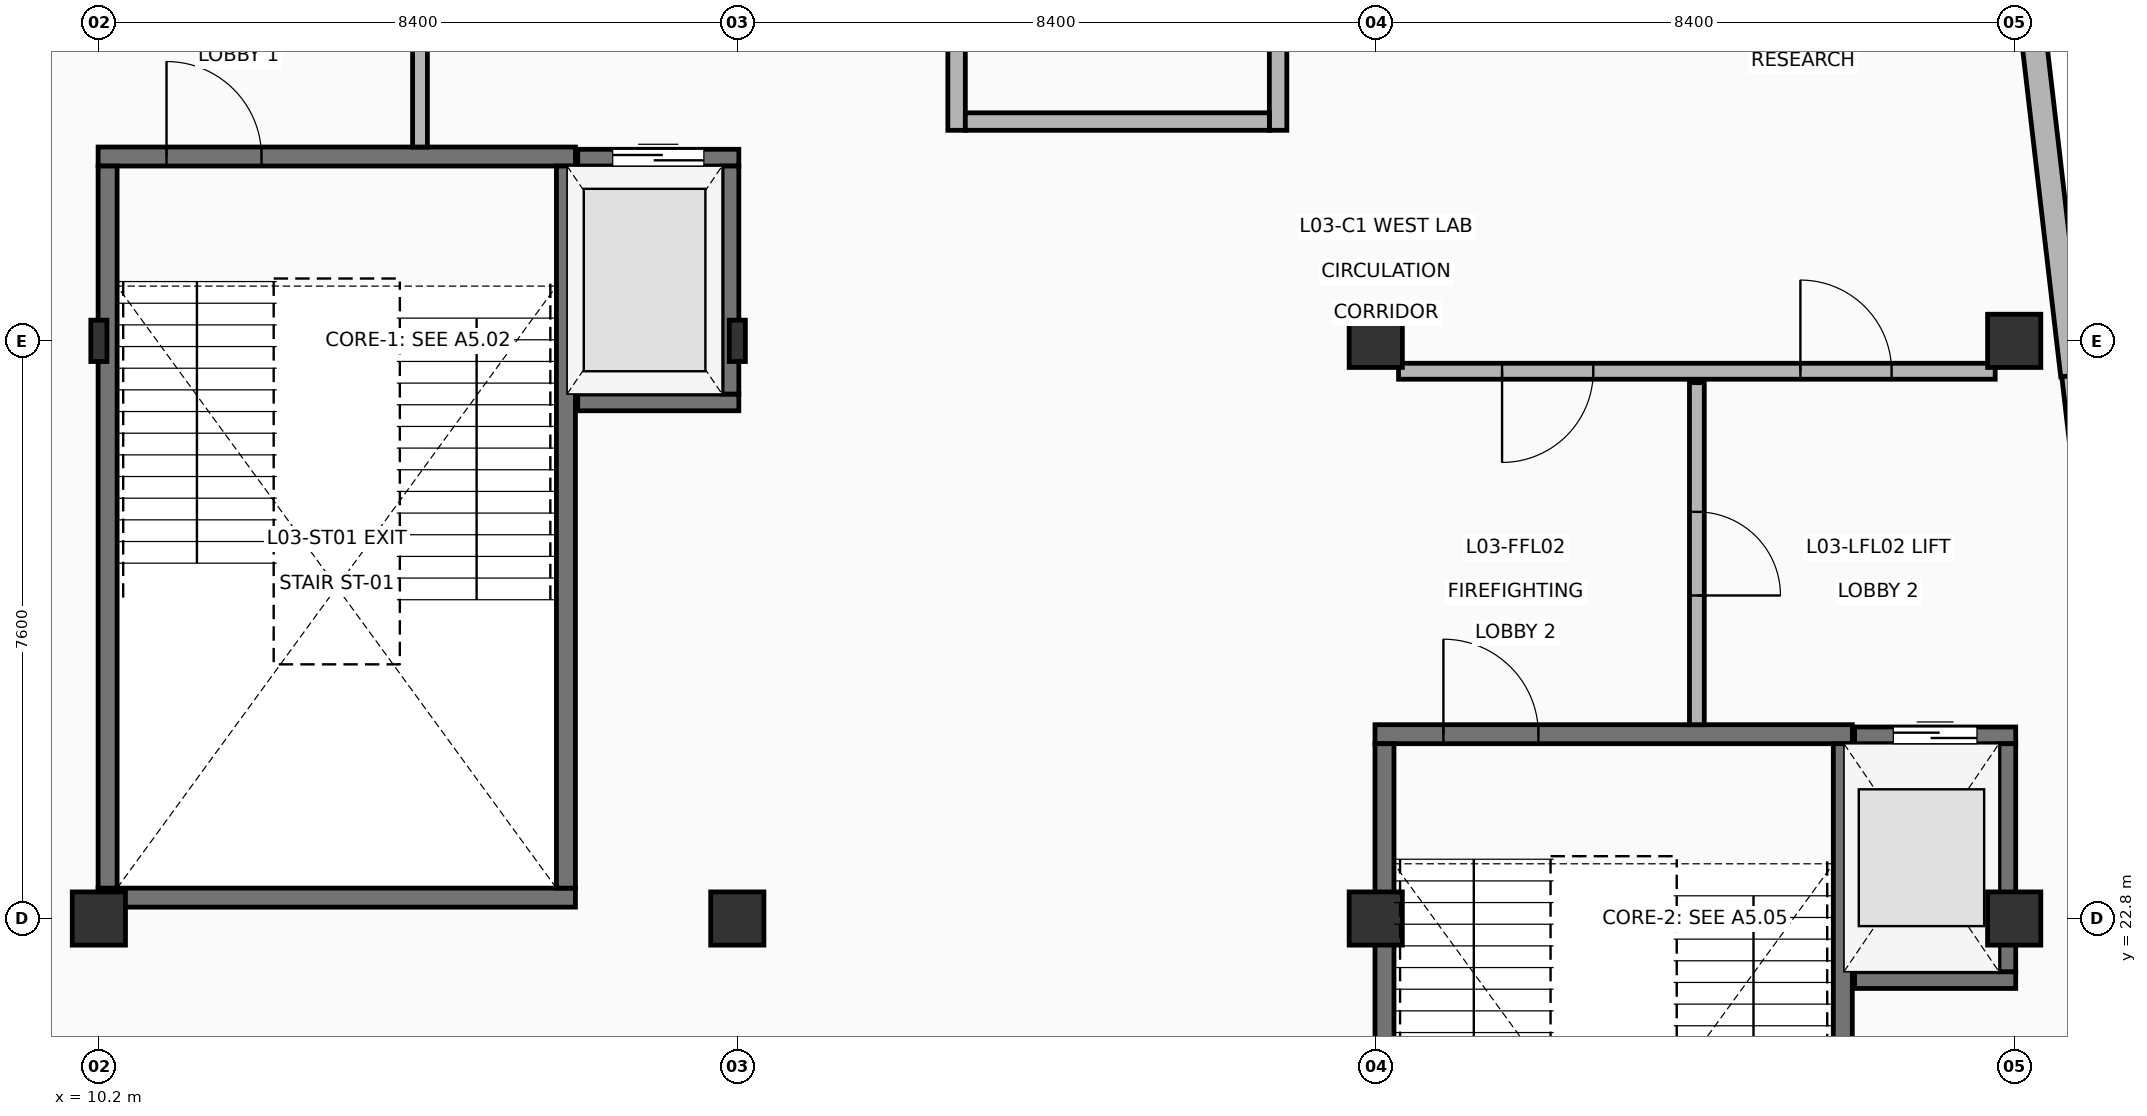
"""IFC4 building model, lengths in metres.
Left out: names, types, materials, properties, quantities, classifications, styles, units other than length and angle.
Written with IfcOpenShell. Run it as: python <this file> out.ifc"""

import sys

from ifc_helpers import new_model, si_unit, direction, frame, frame_2d, origin, origin_2d, place, context, subcontext, project, spatial, rectangle, i_section, extrude, element, fill, save


model = new_model("IFC4")
c1 = context("Model", 3, precision=1e-05, world=origin(), true_north=direction((0.0, 1.0)))
c2 = subcontext(c1, "Body", "Model", "MODEL_VIEW")
j1 = project(units=[si_unit("LENGTHUNIT", "METRE"), si_unit("PLANEANGLEUNIT", "RADIAN")], contexts=[c1])
p1 = place(None, origin())
s1 = spatial("IfcSite", under=j1, at=p1, CompositionType="ELEMENT")
p2 = place(p1, origin())
s2 = spatial("IfcBuilding", under=s1, at=p2, CompositionType="ELEMENT")
p3 = place(p2, frame((0.0, 0.0, 10.5)))
s3 = spatial("IfcBuildingStorey", under=s2, at=p3, CompositionType="ELEMENT", Elevation=10.5)
p4 = place(p3, frame((10.2, 22.8, 0.0), z_axis=(0.0, 0.0, 1.0), x_axis=(1.0, 0.0, 0.0)))
e1 = element("IfcColumn", 1, at=p4, inside=s3, PredefinedType="COLUMN", context=c2, shape_type="SweptSolid", body=[
    extrude(rectangle(XDim=0.7, YDim=0.7, at=origin_2d()), origin(), (0.0, 0.0, 1.0), 4.8),
])
p5 = place(p3, frame((10.2, 30.4, 0.0), z_axis=(0.0, 0.0, 1.0), x_axis=(1.0, 0.0, 0.0)))
e2 = element("IfcColumn", 2, at=p5, inside=s3, PredefinedType="COLUMN", context=c2, shape_type="SweptSolid", body=[
    extrude(i_section(OverallWidth=0.212, OverallDepth=0.544, WebThickness=0.013, FlangeThickness=0.021, at=origin_2d()), origin(), (0.0, 0.0, 1.0), 4.8),
])
p6 = place(p3, frame((18.6, 22.8, 0.0), z_axis=(0.0, 0.0, 1.0), x_axis=(1.0, 0.0, 0.0)))
e3 = element("IfcColumn", 3, at=p6, inside=s3, PredefinedType="COLUMN", context=c2, shape_type="SweptSolid", body=[
    extrude(rectangle(XDim=0.7, YDim=0.7, at=origin_2d()), origin(), (0.0, 0.0, 1.0), 4.8),
])
p7 = place(p3, frame((18.6, 30.4, 0.0), z_axis=(0.0, 0.0, 1.0), x_axis=(1.0, 0.0, 0.0)))
e4 = element("IfcColumn", 4, at=p7, inside=s3, PredefinedType="COLUMN", context=c2, shape_type="SweptSolid", body=[
    extrude(i_section(OverallWidth=0.212, OverallDepth=0.544, WebThickness=0.013, FlangeThickness=0.021, at=origin_2d()), origin(), (0.0, 0.0, 1.0), 4.8),
])
for number, where, z_axis, x_axis in (
    (5, (27.0, 22.8, 0.0), (0.0, 0.0, 1.0), (1.0, 0.0, 0.0)),
    (6, (27.0, 30.4, 0.0), (0.0, 0.0, 1.0), (1.0, 0.0, 0.0)),
    (7, (35.4, 22.8, 0.0), (0.0, 0.0, 1.0), (1.0, 0.0, 0.0)),
    (8, (35.4, 30.4, 0.0), (0.0, 0.0, 1.0), (1.0, 0.0, 0.0)),
):
    element("IfcColumn", number, at=place(p3, frame(where, z_axis=z_axis, x_axis=x_axis)), inside=s3, PredefinedType="COLUMN", context=c2, shape_type="SweptSolid", body=[
        extrude(rectangle(XDim=0.7, YDim=0.7, at=origin_2d()), origin(), (0.0, 0.0, 1.0), 4.8),
    ])
p8 = place(p3, frame((35.282, 37.611, 0.0), z_axis=(0.0, 0.0, 1.0), x_axis=(0.115574885505, -0.993298769676, 0.0)))
e9 = element("IfcWall", 9, at=p8, inside=s3, PredefinedType="SOLIDWALL", context=c2, shape_type="SweptSolid", body=[
    extrude(rectangle(XDim=7.719, YDim=0.325, at=frame_2d((3.859, 0.0))), origin(), (0.0, 0.0, 1.0), 4.026),
])
p9 = place(p3, frame((36.181, 29.945, 0.0), z_axis=(0.0, 0.0, 1.0), x_axis=(0.115623027475, -0.993293166954, 0.0)))
e10 = element("IfcWall", 10, at=p9, inside=s3, PredefinedType="SOLIDWALL", context=c2, shape_type="SweptSolid", body=[
    extrude(rectangle(XDim=8.07, YDim=0.312, at=frame_2d((4.035, 0.0))), origin(), (0.0, 0.0, 1.0), 4.575),
])
p10 = place(p3, frame((10.19, 23.075, 0.0), z_axis=(0.0, 0.0, 1.0), x_axis=(1.0, 0.0, 0.0)))
e11 = element("IfcWall", 11, at=p10, inside=s3, PredefinedType="SHEAR", context=c2, shape_type="SweptSolid", body=[
    extrude(rectangle(XDim=6.28, YDim=0.25, at=frame_2d((3.14, 0.0))), origin(), (0.0, 0.0, 1.0), 4.575),
])
p11 = place(p3, frame((10.19, 32.825, 0.0), z_axis=(0.0, 0.0, 1.0), x_axis=(1.0, 0.0, 0.0)))
e12 = element("IfcWall", 12, at=p11, inside=s3, PredefinedType="SHEAR", context=c2, shape_type="SweptSolid", body=[
    extrude(rectangle(XDim=6.28, YDim=0.25, at=frame_2d((3.14, 0.0))), origin(), (0.0, 0.0, 1.0), 4.575),
])
p12 = place(p11, frame((0.9, 0.0, 0.0)))
e13 = element("IfcOpeningElement", 13, at=p12, cuts=e12, PredefinedType="OPENING", context=c2, shape_type="SweptSolid", body=[
    extrude(rectangle(XDim=1.25, YDim=2.2, at=frame_2d((0.625, 1.1))), frame((0.0, 0.135, 0.0), z_axis=(0.0, -1.0, 0.0), x_axis=(1.0, 0.0, 0.0)), (0.0, 0.0, 1.0), 0.27),
])
for number, where, z_axis, x_axis in (
    (14, (10.315, 23.2, 0.0), (0.0, 0.0, 1.0), (0.0, 1.0, 0.0)),
    (15, (16.345, 23.2, 0.0), (0.0, 0.0, 1.0), (0.0, 1.0, 0.0)),
):
    element("IfcWall", number, at=place(p3, frame(where, z_axis=z_axis, x_axis=x_axis)), inside=s3, PredefinedType="SHEAR", context=c2, shape_type="SweptSolid", body=[
        extrude(rectangle(XDim=9.5, YDim=0.25, at=frame_2d((4.75, 0.0))), origin(), (0.0, 0.0, 1.0), 4.575),
    ])
p13 = place(p3, frame((16.5, 29.59, 0.0), z_axis=(0.0, 0.0, 1.0), x_axis=(1.0, 0.0, 0.0)))
e16 = element("IfcWall", 16, at=p13, inside=s3, PredefinedType="SHEAR", context=c2, shape_type="SweptSolid", body=[
    extrude(rectangle(XDim=2.12, YDim=0.22, at=frame_2d((1.06, 0.0))), origin(), (0.0, 0.0, 1.0), 4.575),
])
p14 = place(p3, frame((16.5, 32.81, 0.0), z_axis=(0.0, 0.0, 1.0), x_axis=(1.0, 0.0, 0.0)))
e17 = element("IfcWall", 17, at=p14, inside=s3, PredefinedType="SHEAR", context=c2, shape_type="SweptSolid", body=[
    extrude(rectangle(XDim=2.12, YDim=0.22, at=frame_2d((1.06, 0.0))), origin(), (0.0, 0.0, 1.0), 4.575),
])
p15 = place(p14, frame((0.46, 0.0, 0.0)))
e18 = element("IfcOpeningElement", 18, at=p15, cuts=e17, PredefinedType="OPENING", context=c2, shape_type="SweptSolid", body=[
    extrude(rectangle(XDim=1.2, YDim=2.2, at=frame_2d((0.6, 1.1))), frame((0.0, 0.12, 0.0), z_axis=(0.0, -1.0, 0.0), x_axis=(1.0, 0.0, 0.0)), (0.0, 0.0, 1.0), 0.24),
])
p16 = place(p3, frame((18.51, 29.7, 0.0), z_axis=(0.0, 0.0, 1.0), x_axis=(0.0, 1.0, 0.0)))
e19 = element("IfcWall", 19, at=p16, inside=s3, PredefinedType="SHEAR", context=c2, shape_type="SweptSolid", body=[
    extrude(rectangle(XDim=3.0, YDim=0.22, at=frame_2d((1.5, 0.0))), origin(), (0.0, 0.0, 1.0), 4.575),
])
p17 = place(p3, frame((14.425, 32.95, 0.0), z_axis=(0.0, 0.0, 1.0), x_axis=(0.0, 1.0, 0.0)))
e20 = element("IfcWall", 20, at=p17, inside=s3, PredefinedType="PARTITIONING", context=c2, shape_type="SweptSolid", body=[
    extrude(rectangle(XDim=4.5, YDim=0.195, at=frame_2d((2.25, 0.0))), origin(), (0.0, 0.0, 1.0), 4.575),
])
p18 = place(p17, frame((1.7, 0.0, 0.0)))
e21 = element("IfcOpeningElement", 21, at=p18, cuts=e20, PredefinedType="OPENING", context=c2, shape_type="SweptSolid", body=[
    extrude(rectangle(XDim=1.1, YDim=2.15, at=frame_2d((0.55, 1.075))), frame((0.0, 0.107, 0.0), z_axis=(0.0, -1.0, 0.0), x_axis=(1.0, 0.0, 0.0)), (0.0, 0.0, 1.0), 0.215),
])
p19 = place(p3, frame((26.99, 25.225, 0.0), z_axis=(0.0, 0.0, 1.0), x_axis=(1.0, 0.0, 0.0)))
e22 = element("IfcWall", 22, at=p19, inside=s3, PredefinedType="SHEAR", context=c2, shape_type="SweptSolid", body=[
    extrude(rectangle(XDim=6.28, YDim=0.25, at=frame_2d((3.14, 0.0))), origin(), (0.0, 0.0, 1.0), 4.575),
])
p20 = place(p19, frame((0.9, 0.0, 0.0)))
e23 = element("IfcOpeningElement", 23, at=p20, cuts=e22, PredefinedType="OPENING", context=c2, shape_type="SweptSolid", body=[
    extrude(rectangle(XDim=1.25, YDim=2.2, at=frame_2d((0.625, 1.1))), frame((0.0, 0.135, 0.0), z_axis=(0.0, -1.0, 0.0), x_axis=(1.0, 0.0, 0.0)), (0.0, 0.0, 1.0), 0.27),
])
for number, where, z_axis, x_axis in (
    (24, (27.115, 15.6, 0.0), (0.0, 0.0, 1.0), (0.0, 1.0, 0.0)),
    (25, (33.145, 15.6, 0.0), (0.0, 0.0, 1.0), (0.0, 1.0, 0.0)),
):
    element("IfcWall", number, at=place(p3, frame(where, z_axis=z_axis, x_axis=x_axis)), inside=s3, PredefinedType="SHEAR", context=c2, shape_type="SweptSolid", body=[
        extrude(rectangle(XDim=9.5, YDim=0.25, at=frame_2d((4.75, 0.0))), origin(), (0.0, 0.0, 1.0), 4.575),
    ])
p21 = place(p3, frame((33.3, 21.99, 0.0), z_axis=(0.0, 0.0, 1.0), x_axis=(1.0, 0.0, 0.0)))
e26 = element("IfcWall", 26, at=p21, inside=s3, PredefinedType="SHEAR", context=c2, shape_type="SweptSolid", body=[
    extrude(rectangle(XDim=2.12, YDim=0.22, at=frame_2d((1.06, 0.0))), origin(), (0.0, 0.0, 1.0), 4.575),
])
p22 = place(p3, frame((33.3, 25.21, 0.0), z_axis=(0.0, 0.0, 1.0), x_axis=(1.0, 0.0, 0.0)))
e27 = element("IfcWall", 27, at=p22, inside=s3, PredefinedType="SHEAR", context=c2, shape_type="SweptSolid", body=[
    extrude(rectangle(XDim=2.12, YDim=0.22, at=frame_2d((1.06, 0.0))), origin(), (0.0, 0.0, 1.0), 4.575),
])
p23 = place(p22, frame((0.51, 0.0, 0.0)))
e28 = element("IfcOpeningElement", 28, at=p23, cuts=e27, PredefinedType="OPENING", context=c2, shape_type="SweptSolid", body=[
    extrude(rectangle(XDim=1.1, YDim=2.15, at=frame_2d((0.55, 1.075))), frame((0.0, 0.12, 0.0), z_axis=(0.0, -1.0, 0.0), x_axis=(1.0, 0.0, 0.0)), (0.0, 0.0, 1.0), 0.24),
])
p24 = place(p3, frame((35.31, 22.1, 0.0), z_axis=(0.0, 0.0, 1.0), x_axis=(0.0, 1.0, 0.0)))
e29 = element("IfcWall", 29, at=p24, inside=s3, PredefinedType="SHEAR", context=c2, shape_type="SweptSolid", body=[
    extrude(rectangle(XDim=3.0, YDim=0.22, at=frame_2d((1.5, 0.0))), origin(), (0.0, 0.0, 1.0), 4.575),
])
p25 = place(p3, frame((27.3, 30.0, 0.0), z_axis=(0.0, 0.0, 1.0), x_axis=(1.0, 0.0, 0.0)))
e30 = element("IfcWall", 30, at=p25, inside=s3, PredefinedType="PARTITIONING", context=c2, shape_type="SweptSolid", body=[
    extrude(rectangle(XDim=7.85, YDim=0.21, at=frame_2d((3.925, 0.0))), origin(), (0.0, 0.0, 1.0), 4.575),
])
p26 = place(p25, frame((1.362, 0.0, 0.0)))
e31 = element("IfcOpeningElement", 31, at=p26, cuts=e30, PredefinedType="OPENING", context=c2, shape_type="SweptSolid", body=[
    extrude(rectangle(XDim=1.2, YDim=2.2, at=frame_2d((0.6, 1.1))), frame((0.0, 0.115, 0.0), z_axis=(0.0, -1.0, 0.0), x_axis=(1.0, 0.0, 0.0)), (0.0, 0.0, 1.0), 0.23),
])
p27 = place(p25, frame((5.287, 0.0, 0.0)))
e32 = element("IfcOpeningElement", 32, at=p27, cuts=e30, PredefinedType="OPENING", context=c2, shape_type="SweptSolid", body=[
    extrude(rectangle(XDim=1.2, YDim=2.2, at=frame_2d((0.6, 1.1))), frame((0.0, 0.115, 0.0), z_axis=(0.0, -1.0, 0.0), x_axis=(1.0, 0.0, 0.0)), (0.0, 0.0, 1.0), 0.23),
])
p28 = place(p3, frame((31.225, 25.35, 0.0), z_axis=(0.0, 0.0, 1.0), x_axis=(0.0, 1.0, 0.0)))
e33 = element("IfcWall", 33, at=p28, inside=s3, PredefinedType="PARTITIONING", context=c2, shape_type="SweptSolid", body=[
    extrude(rectangle(XDim=4.5, YDim=0.195, at=frame_2d((2.25, 0.0))), origin(), (0.0, 0.0, 1.0), 4.575),
])
p29 = place(p28, frame((1.7, 0.0, 0.0)))
e34 = element("IfcOpeningElement", 34, at=p29, cuts=e33, PredefinedType="OPENING", context=c2, shape_type="SweptSolid", body=[
    extrude(rectangle(XDim=1.1, YDim=2.15, at=frame_2d((0.55, 1.075))), frame((0.0, 0.107, 0.0), z_axis=(0.0, -1.0, 0.0), x_axis=(1.0, 0.0, 0.0)), (0.0, 0.0, 1.0), 0.215),
])
p30 = place(p3, frame((21.485, 33.17, 0.0), z_axis=(0.0, 0.0, 1.0), x_axis=(0.0, 1.0, 0.0)))
e35 = element("IfcWall", 35, at=p30, inside=s3, PredefinedType="PLUMBINGWALL", context=c2, shape_type="SweptSolid", body=[
    extrude(rectangle(XDim=4.46, YDim=0.23, at=frame_2d((2.23, 0.0))), origin(), (0.0, 0.0, 1.0), 4.575),
])
p31 = place(p30, frame((1.755, 0.0, 0.0)))
e36 = element("IfcOpeningElement", 36, at=p31, cuts=e35, PredefinedType="OPENING", context=c2, shape_type="SweptSolid", body=[
    extrude(rectangle(XDim=0.95, YDim=2.1, at=frame_2d((0.475, 1.05))), frame((0.0, 0.125, 0.0), z_axis=(0.0, -1.0, 0.0), x_axis=(1.0, 0.0, 0.0)), (0.0, 0.0, 1.0), 0.25),
])
p32 = place(p3, frame((25.715, 33.17, 0.0), z_axis=(0.0, 0.0, 1.0), x_axis=(0.0, 1.0, 0.0)))
e37 = element("IfcWall", 37, at=p32, inside=s3, PredefinedType="PLUMBINGWALL", context=c2, shape_type="SweptSolid", body=[
    extrude(rectangle(XDim=4.46, YDim=0.23, at=frame_2d((2.23, 0.0))), origin(), (0.0, 0.0, 1.0), 4.575),
])
p33 = place(p32, frame((1.755, 0.0, 0.0)))
e38 = element("IfcOpeningElement", 38, at=p33, cuts=e37, PredefinedType="OPENING", context=c2, shape_type="SweptSolid", body=[
    extrude(rectangle(XDim=0.95, YDim=2.1, at=frame_2d((0.475, 1.05))), frame((0.0, 0.125, 0.0), z_axis=(0.0, -1.0, 0.0), x_axis=(1.0, 0.0, 0.0)), (0.0, 0.0, 1.0), 0.25),
])
p34 = place(p3, frame((21.6, 33.285, 0.0), z_axis=(0.0, 0.0, 1.0), x_axis=(1.0, 0.0, 0.0)))
e39 = element("IfcWall", 39, at=p34, inside=s3, PredefinedType="PLUMBINGWALL", context=c2, shape_type="SweptSolid", body=[
    extrude(rectangle(XDim=4.0, YDim=0.23, at=frame_2d((2.0, 0.0))), origin(), (0.0, 0.0, 1.0), 4.153),
])
p35 = place(p12, origin())
e40 = element("IfcDoor", 40, at=p35, inside=s3, OperationType="SINGLE_SWING_LEFT", PredefinedType="DOOR", context=c2, shape_type="SweptSolid", body=[
    extrude(rectangle(XDim=1.25, YDim=2.2, at=frame_2d((0.625, 1.1))), frame((0.0, 0.025, 0.0), z_axis=(0.0, -1.0, 0.0), x_axis=(1.0, 0.0, 0.0)), (0.0, 0.0, 1.0), 0.05),
])
fill(e13, e40)
p36 = place(p15, origin())
e41 = element("IfcDoor", 41, at=p36, inside=s3, OperationType="DOUBLE_DOOR_SLIDING", PredefinedType="DOOR", context=c2, shape_type="SweptSolid", body=[
    extrude(rectangle(XDim=1.2, YDim=2.2, at=frame_2d((0.6, 1.1))), frame((0.0, 0.025, 0.0), z_axis=(0.0, -1.0, 0.0), x_axis=(1.0, 0.0, 0.0)), (0.0, 0.0, 1.0), 0.05),
])
fill(e18, e41)
p37 = place(p20, origin())
e42 = element("IfcDoor", 42, at=p37, inside=s3, OperationType="SINGLE_SWING_LEFT", PredefinedType="DOOR", context=c2, shape_type="SweptSolid", body=[
    extrude(rectangle(XDim=1.25, YDim=2.2, at=frame_2d((0.625, 1.1))), frame((0.0, 0.025, 0.0), z_axis=(0.0, -1.0, 0.0), x_axis=(1.0, 0.0, 0.0)), (0.0, 0.0, 1.0), 0.05),
])
fill(e23, e42)
p38 = place(p23, origin())
e43 = element("IfcDoor", 43, at=p38, inside=s3, OperationType="DOUBLE_DOOR_SLIDING", PredefinedType="DOOR", context=c2, shape_type="SweptSolid", body=[
    extrude(rectangle(XDim=1.1, YDim=2.15, at=frame_2d((0.55, 1.075))), frame((0.0, 0.025, 0.0), z_axis=(0.0, -1.0, 0.0), x_axis=(1.0, 0.0, 0.0)), (0.0, 0.0, 1.0), 0.05),
])
fill(e28, e43)
p39 = place(p26, origin())
e44 = element("IfcDoor", 44, at=p39, inside=s3, OperationType="SINGLE_SWING_RIGHT", PredefinedType="DOOR", context=c2, shape_type="SweptSolid", body=[
    extrude(rectangle(XDim=1.2, YDim=2.2, at=frame_2d((0.6, 1.1))), frame((0.0, 0.025, 0.0), z_axis=(0.0, -1.0, 0.0), x_axis=(1.0, 0.0, 0.0)), (0.0, 0.0, 1.0), 0.05),
])
fill(e31, e44)
p40 = place(p27, origin())
e45 = element("IfcDoor", 45, at=p40, inside=s3, OperationType="SINGLE_SWING_LEFT", PredefinedType="DOOR", context=c2, shape_type="SweptSolid", body=[
    extrude(rectangle(XDim=1.2, YDim=2.2, at=frame_2d((0.6, 1.1))), frame((0.0, 0.025, 0.0), z_axis=(0.0, -1.0, 0.0), x_axis=(1.0, 0.0, 0.0)), (0.0, 0.0, 1.0), 0.05),
])
fill(e32, e45)
p41 = place(p29, origin())
e46 = element("IfcDoor", 46, at=p41, inside=s3, OperationType="SINGLE_SWING_RIGHT", PredefinedType="DOOR", context=c2, shape_type="SweptSolid", body=[
    extrude(rectangle(XDim=1.1, YDim=2.15, at=frame_2d((0.55, 1.075))), frame((0.0, 0.025, 0.0), z_axis=(0.0, -1.0, 0.0), x_axis=(1.0, 0.0, 0.0)), (0.0, 0.0, 1.0), 0.05),
])
fill(e34, e46)
save(model, sys.argv[1])
